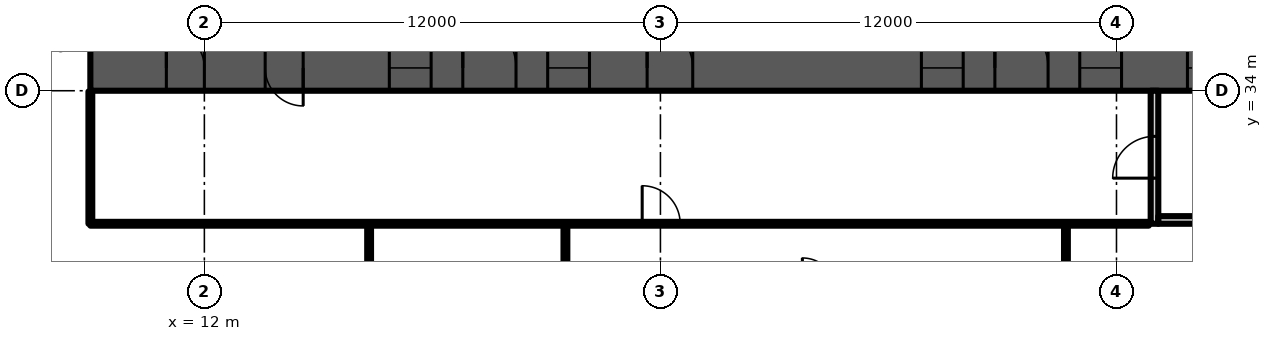
"""IFC4 building model, lengths in metres.
Left out: names, types, materials, properties, quantities, classifications, styles, units other than length and angle.
Written with IfcOpenShell. Run it as: python <this file> out.ifc"""

import sys

from ifc_helpers import new_model, si_unit, direction, frame, frame_2d, origin, place, context, subcontext, project, spatial, rectangle, extrude, element, fill, save


model = new_model("IFC4")
c1 = context("Model", 3, precision=1e-05, world=origin(), true_north=direction((0.0, 1.0)))
c2 = subcontext(c1, "Body", "Model", "MODEL_VIEW")
j1 = project(units=[si_unit("LENGTHUNIT", "METRE"), si_unit("PLANEANGLEUNIT", "RADIAN")], contexts=[c1])
p1 = place(None, origin())
s1 = spatial("IfcSite", under=j1, at=p1, CompositionType="ELEMENT")
p2 = place(p1, origin())
s2 = spatial("IfcBuilding", under=s1, at=p2, CompositionType="ELEMENT")
p3 = place(p2, frame((0.0, 0.0, 88.3)))
s3 = spatial("IfcBuildingStorey", under=s2, at=p3, CompositionType="ELEMENT", Elevation=88.3)
p4 = place(p3, frame((9.0, 34.6, 0.0), z_axis=(0.0, 0.0, 1.0), x_axis=(1.0, 0.0, 0.0)))
e1 = element("IfcWall", 1, at=p4, inside=s3, PredefinedType="SHEAR", context=c2, shape_type="SweptSolid", body=[
    extrude(rectangle(XDim=56.0, YDim=1.2, at=frame_2d((28.0, 0.0))), origin(), (0.0, 0.0, 1.0), 3.6),
])
p5 = place(p4, frame((2.0, 0.0, 0.0)))
e2 = element("IfcOpeningElement", 2, at=p5, cuts=e1, PredefinedType="OPENING", context=c2, shape_type="SweptSolid", body=[
    extrude(rectangle(XDim=1.0, YDim=2.1, at=frame_2d((0.5, 1.05))), frame((0.0, 0.61, 0.0), z_axis=(0.0, -1.0, 0.0), x_axis=(1.0, 0.0, 0.0)), (0.0, 0.0, 1.0), 1.22),
])
p6 = place(p4, frame((4.6, 0.0, 0.0)))
e3 = element("IfcOpeningElement", 3, at=p6, cuts=e1, PredefinedType="OPENING", context=c2, shape_type="SweptSolid", body=[
    extrude(rectangle(XDim=1.0, YDim=2.1, at=frame_2d((0.5, 1.05))), frame((0.0, 0.61, 0.0), z_axis=(0.0, -1.0, 0.0), x_axis=(1.0, 0.0, 0.0)), (0.0, 0.0, 1.0), 1.22),
])
p7 = place(p4, frame((7.867, 0.0, 0.0)))
e4 = element("IfcOpeningElement", 4, at=p7, cuts=e1, PredefinedType="OPENING", context=c2, shape_type="SweptSolid", body=[
    extrude(rectangle(XDim=1.1, YDim=2.1, at=frame_2d((0.55, 1.05))), frame((0.0, 0.61, 0.0), z_axis=(0.0, -1.0, 0.0), x_axis=(1.0, 0.0, 0.0)), (0.0, 0.0, 1.0), 1.22),
])
p8 = place(p4, frame((12.033, 0.0, 0.0)))
e5 = element("IfcOpeningElement", 5, at=p8, cuts=e1, PredefinedType="OPENING", context=c2, shape_type="SweptSolid", body=[
    extrude(rectangle(XDim=1.1, YDim=2.1, at=frame_2d((0.55, 1.05))), frame((0.0, 0.61, 0.0), z_axis=(0.0, -1.0, 0.0), x_axis=(1.0, 0.0, 0.0)), (0.0, 0.0, 1.0), 1.22),
])
p9 = place(p4, frame((9.8, 0.0, 0.0)))
e6 = element("IfcOpeningElement", 6, at=p9, cuts=e1, PredefinedType="OPENING", context=c2, shape_type="SweptSolid", body=[
    extrude(rectangle(XDim=1.4, YDim=2.1, at=frame_2d((0.7, 1.05))), frame((0.0, 0.61, 0.0), z_axis=(0.0, -1.0, 0.0), x_axis=(1.0, 0.0, 0.0)), (0.0, 0.0, 1.0), 1.22),
])
p10 = place(p4, frame((14.65, 0.0, 0.0)))
e7 = element("IfcOpeningElement", 7, at=p10, cuts=e1, PredefinedType="OPENING", context=c2, shape_type="SweptSolid", body=[
    extrude(rectangle(XDim=1.2, YDim=2.1, at=frame_2d((0.6, 1.05))), frame((0.0, 0.61, 0.0), z_axis=(0.0, -1.0, 0.0), x_axis=(1.0, 0.0, 0.0)), (0.0, 0.0, 1.0), 1.22),
])
p11 = place(p4, frame((21.867, 0.0, 0.0)))
e8 = element("IfcOpeningElement", 8, at=p11, cuts=e1, PredefinedType="OPENING", context=c2, shape_type="SweptSolid", body=[
    extrude(rectangle(XDim=1.1, YDim=2.1, at=frame_2d((0.55, 1.05))), frame((0.0, 0.61, 0.0), z_axis=(0.0, -1.0, 0.0), x_axis=(1.0, 0.0, 0.0)), (0.0, 0.0, 1.0), 1.22),
])
p12 = place(p4, frame((26.033, 0.0, 0.0)))
e9 = element("IfcOpeningElement", 9, at=p12, cuts=e1, PredefinedType="OPENING", context=c2, shape_type="SweptSolid", body=[
    extrude(rectangle(XDim=1.1, YDim=2.1, at=frame_2d((0.55, 1.05))), frame((0.0, 0.61, 0.0), z_axis=(0.0, -1.0, 0.0), x_axis=(1.0, 0.0, 0.0)), (0.0, 0.0, 1.0), 1.22),
])
p13 = place(p4, frame((23.8, 0.0, 0.0)))
e10 = element("IfcOpeningElement", 10, at=p13, cuts=e1, PredefinedType="OPENING", context=c2, shape_type="SweptSolid", body=[
    extrude(rectangle(XDim=1.4, YDim=2.1, at=frame_2d((0.7, 1.05))), frame((0.0, 0.61, 0.0), z_axis=(0.0, -1.0, 0.0), x_axis=(1.0, 0.0, 0.0)), (0.0, 0.0, 1.0), 1.22),
])
p14 = place(p4, frame((28.867, 0.0, 0.0)))
e11 = element("IfcOpeningElement", 11, at=p14, cuts=e1, PredefinedType="OPENING", context=c2, shape_type="SweptSolid", body=[
    extrude(rectangle(XDim=1.1, YDim=2.1, at=frame_2d((0.55, 1.05))), frame((0.0, 0.61, 0.0), z_axis=(0.0, -1.0, 0.0), x_axis=(1.0, 0.0, 0.0)), (0.0, 0.0, 1.0), 1.22),
])
p15 = place(p4, frame((33.033, 0.0, 0.0)))
e12 = element("IfcOpeningElement", 12, at=p15, cuts=e1, PredefinedType="OPENING", context=c2, shape_type="SweptSolid", body=[
    extrude(rectangle(XDim=1.1, YDim=2.1, at=frame_2d((0.55, 1.05))), frame((0.0, 0.61, 0.0), z_axis=(0.0, -1.0, 0.0), x_axis=(1.0, 0.0, 0.0)), (0.0, 0.0, 1.0), 1.22),
])
p16 = place(p4, frame((40.15, 0.0, 0.0)))
e13 = element("IfcOpeningElement", 13, at=p16, cuts=e1, PredefinedType="OPENING", context=c2, shape_type="SweptSolid", body=[
    extrude(rectangle(XDim=1.2, YDim=2.1, at=frame_2d((0.6, 1.05))), frame((0.0, 0.61, 0.0), z_axis=(0.0, -1.0, 0.0), x_axis=(1.0, 0.0, 0.0)), (0.0, 0.0, 1.0), 1.22),
])
p17 = place(p4, frame((44.8, 0.0, 0.0)))
e14 = element("IfcOpeningElement", 14, at=p17, cuts=e1, PredefinedType="OPENING", context=c2, shape_type="SweptSolid", body=[
    extrude(rectangle(XDim=1.4, YDim=2.1, at=frame_2d((0.7, 1.05))), frame((0.0, 0.61, 0.0), z_axis=(0.0, -1.0, 0.0), x_axis=(1.0, 0.0, 0.0)), (0.0, 0.0, 1.0), 1.22),
])
p18 = place(p4, frame((49.867, 0.0, 0.0)))
e15 = element("IfcOpeningElement", 15, at=p18, cuts=e1, PredefinedType="OPENING", context=c2, shape_type="SweptSolid", body=[
    extrude(rectangle(XDim=1.1, YDim=2.1, at=frame_2d((0.55, 1.05))), frame((0.0, 0.61, 0.0), z_axis=(0.0, -1.0, 0.0), x_axis=(1.0, 0.0, 0.0)), (0.0, 0.0, 1.0), 1.22),
])
p19 = place(p4, frame((53.5, 0.0, 0.0)))
e16 = element("IfcOpeningElement", 16, at=p19, cuts=e1, PredefinedType="OPENING", context=c2, shape_type="SweptSolid", body=[
    extrude(rectangle(XDim=1.1, YDim=2.1, at=frame_2d((0.55, 1.05))), frame((0.0, 0.61, 0.0), z_axis=(0.0, -1.0, 0.0), x_axis=(1.0, 0.0, 0.0)), (0.0, 0.0, 1.0), 1.22),
])
p20 = place(p4, frame((51.567, 0.0, 0.0)))
e17 = element("IfcOpeningElement", 17, at=p20, cuts=e1, PredefinedType="OPENING", context=c2, shape_type="SweptSolid", body=[
    extrude(rectangle(XDim=1.4, YDim=2.1, at=frame_2d((0.7, 1.05))), frame((0.0, 0.61, 0.0), z_axis=(0.0, -1.0, 0.0), x_axis=(1.0, 0.0, 0.0)), (0.0, 0.0, 1.0), 1.22),
])
p21 = place(p3, frame((37.0, 30.5, 0.0), z_axis=(0.0, 0.0, 1.0), x_axis=(0.0, 1.0, 0.0)))
e18 = element("IfcWall", 18, at=p21, inside=s3, PredefinedType="PARTITIONING", context=c2, shape_type="SweptSolid", body=[
    extrude(rectangle(XDim=3.5, YDim=0.2, at=frame_2d((1.75, 0.0))), origin(), (0.0, 0.0, 1.0), 3.15),
])
p22 = place(p21, frame((1.2, 0.0, 0.0)))
e19 = element("IfcOpeningElement", 19, at=p22, cuts=e18, PredefinedType="OPENING", context=c2, shape_type="SweptSolid", body=[
    extrude(rectangle(XDim=1.1, YDim=2.1, at=frame_2d((0.55, 1.05))), frame((0.0, 0.11, 0.0), z_axis=(0.0, -1.0, 0.0), x_axis=(1.0, 0.0, 0.0)), (0.0, 0.0, 1.0), 0.22),
])
p23 = place(p3, frame((37.1, 30.6, 0.0), z_axis=(0.0, 0.0, 1.0), x_axis=(1.0, 0.0, 0.0)))
e20 = element("IfcWall", 20, at=p23, inside=s3, PredefinedType="PARTITIONING", context=c2, shape_type="SweptSolid", body=[
    extrude(rectangle(XDim=2.8, YDim=0.2, at=frame_2d((1.4, 0.0))), origin(), (0.0, 0.0, 1.0), 3.15),
])
p24 = place(p3, frame((9.0, 30.5, 0.0), z_axis=(0.0, 0.0, 1.0), x_axis=(0.0, 1.0, 0.0)))
e21 = element("IfcWall", 21, at=p24, inside=s3, PredefinedType="PARTITIONING", context=c2, shape_type="SweptSolid", body=[
    extrude(rectangle(XDim=3.48, YDim=0.1, at=frame_2d((1.74, 0.0))), origin(), (0.0, 0.0, 1.0), 3.15),
])
p25 = place(p3, frame((9.0, 30.5, 0.0), z_axis=(0.0, 0.0, 1.0), x_axis=(1.0, 0.0, 0.0)))
e22 = element("IfcWall", 22, at=p25, inside=s3, PredefinedType="PARTITIONING", context=c2, shape_type="SweptSolid", body=[
    extrude(rectangle(XDim=27.85, YDim=0.1, at=frame_2d((13.925, 0.0))), origin(), (0.0, 0.0, 1.0), 3.15),
])
p26 = place(p25, frame((14.52, 0.0, 0.0)))
e23 = element("IfcOpeningElement", 23, at=p26, cuts=e22, PredefinedType="OPENING", context=c2, shape_type="SweptSolid", body=[
    extrude(rectangle(XDim=1.0, YDim=2.1, at=frame_2d((0.5, 1.05))), frame((0.0, 0.06, 0.0), z_axis=(0.0, -1.0, 0.0), x_axis=(1.0, 0.0, 0.0)), (0.0, 0.0, 1.0), 0.12),
])
for number, where, z_axis, x_axis in (
    (24, (16.335, 14.93, 0.0), (0.0, 0.0, 1.0), (0.0, 1.0, 0.0)),
    (25, (21.5, 14.93, 0.0), (0.0, 0.0, 1.0), (0.0, 1.0, 0.0)),
):
    element("IfcWall", number, at=place(p3, frame(where, z_axis=z_axis, x_axis=x_axis)), inside=s3, PredefinedType="PARTITIONING", context=c2, shape_type="SweptSolid", body=[
        extrude(rectangle(XDim=15.57, YDim=0.1, at=frame_2d((7.785, 0.0))), origin(), (0.0, 0.0, 1.0), 3.15),
    ])
p27 = place(p3, frame((34.67, 14.93, 0.0), z_axis=(0.0, 0.0, 1.0), x_axis=(0.0, 1.0, 0.0)))
e26 = element("IfcWall", 26, at=p27, inside=s3, PredefinedType="PARTITIONING", context=c2, shape_type="SweptSolid", body=[
    extrude(rectangle(XDim=15.56, YDim=0.1, at=frame_2d((7.78, 0.0))), origin(), (0.0, 0.0, 1.0), 3.15),
])
p28 = place(p5, origin())
e27 = element("IfcDoor", 27, at=p28, inside=s3, OperationType="SINGLE_SWING_LEFT", PredefinedType="DOOR", context=c2, shape_type="SweptSolid", body=[
    extrude(rectangle(XDim=1.0, YDim=2.1, at=frame_2d((0.5, 1.05))), frame((0.0, 0.6, 0.0), z_axis=(0.0, -1.0, 0.0), x_axis=(1.0, 0.0, 0.0)), (0.0, 0.0, 1.0), 1.199),
])
fill(e2, e27)
p29 = place(p6, origin())
e28 = element("IfcDoor", 28, at=p29, inside=s3, OperationType="SINGLE_SWING_RIGHT", PredefinedType="DOOR", context=c2, shape_type="SweptSolid", body=[
    extrude(rectangle(XDim=1.0, YDim=2.1, at=frame_2d((0.5, 1.05))), frame((0.0, 0.6, 0.0), z_axis=(0.0, -1.0, 0.0), x_axis=(1.0, 0.0, 0.0)), (0.0, 0.0, 1.0), 1.199),
])
fill(e3, e28)
p30 = place(p7, origin())
e29 = element("IfcDoor", 29, at=p30, inside=s3, OperationType="DOUBLE_DOOR_SLIDING", PredefinedType="DOOR", context=c2, shape_type="SweptSolid", body=[
    extrude(rectangle(XDim=1.1, YDim=2.1, at=frame_2d((0.55, 1.05))), frame((0.0, 0.025, 0.0), z_axis=(0.0, -1.0, 0.0), x_axis=(1.0, 0.0, 0.0)), (0.0, 0.0, 1.0), 0.05),
])
fill(e4, e29)
p31 = place(p8, origin())
e30 = element("IfcDoor", 30, at=p31, inside=s3, OperationType="DOUBLE_DOOR_SLIDING", PredefinedType="DOOR", context=c2, shape_type="SweptSolid", body=[
    extrude(rectangle(XDim=1.1, YDim=2.1, at=frame_2d((0.55, 1.05))), frame((0.0, 0.025, 0.0), z_axis=(0.0, -1.0, 0.0), x_axis=(1.0, 0.0, 0.0)), (0.0, 0.0, 1.0), 0.05),
])
fill(e5, e30)
p32 = place(p9, origin())
e31 = element("IfcDoor", 31, at=p32, inside=s3, OperationType="DOUBLE_DOOR_SINGLE_SWING", PredefinedType="DOOR", context=c2, shape_type="SweptSolid", body=[
    extrude(rectangle(XDim=1.4, YDim=2.1, at=frame_2d((0.7, 1.05))), frame((0.0, 0.025, 0.0), z_axis=(0.0, -1.0, 0.0), x_axis=(1.0, 0.0, 0.0)), (0.0, 0.0, 1.0), 0.05),
])
fill(e6, e31)
p33 = place(p10, origin())
e32 = element("IfcDoor", 32, at=p33, inside=s3, OperationType="SINGLE_SWING_LEFT", PredefinedType="DOOR", context=c2, shape_type="SweptSolid", body=[
    extrude(rectangle(XDim=1.2, YDim=2.1, at=frame_2d((0.6, 1.05))), frame((0.0, 0.025, 0.0), z_axis=(0.0, -1.0, 0.0), x_axis=(1.0, 0.0, 0.0)), (0.0, 0.0, 1.0), 0.05),
])
fill(e7, e32)
p34 = place(p11, origin())
e33 = element("IfcDoor", 33, at=p34, inside=s3, OperationType="DOUBLE_DOOR_SLIDING", PredefinedType="DOOR", context=c2, shape_type="SweptSolid", body=[
    extrude(rectangle(XDim=1.1, YDim=2.1, at=frame_2d((0.55, 1.05))), frame((0.0, 0.025, 0.0), z_axis=(0.0, -1.0, 0.0), x_axis=(1.0, 0.0, 0.0)), (0.0, 0.0, 1.0), 0.05),
])
fill(e8, e33)
p35 = place(p12, origin())
e34 = element("IfcDoor", 34, at=p35, inside=s3, OperationType="DOUBLE_DOOR_SLIDING", PredefinedType="DOOR", context=c2, shape_type="SweptSolid", body=[
    extrude(rectangle(XDim=1.1, YDim=2.1, at=frame_2d((0.55, 1.05))), frame((0.0, 0.025, 0.0), z_axis=(0.0, -1.0, 0.0), x_axis=(1.0, 0.0, 0.0)), (0.0, 0.0, 1.0), 0.05),
])
fill(e9, e34)
p36 = place(p13, origin())
e35 = element("IfcDoor", 35, at=p36, inside=s3, OperationType="DOUBLE_DOOR_SINGLE_SWING", PredefinedType="DOOR", context=c2, shape_type="SweptSolid", body=[
    extrude(rectangle(XDim=1.4, YDim=2.1, at=frame_2d((0.7, 1.05))), frame((0.0, 0.025, 0.0), z_axis=(0.0, -1.0, 0.0), x_axis=(1.0, 0.0, 0.0)), (0.0, 0.0, 1.0), 0.05),
])
fill(e10, e35)
p37 = place(p14, origin())
e36 = element("IfcDoor", 36, at=p37, inside=s3, OperationType="DOUBLE_DOOR_SLIDING", PredefinedType="DOOR", context=c2, shape_type="SweptSolid", body=[
    extrude(rectangle(XDim=1.1, YDim=2.1, at=frame_2d((0.55, 1.05))), frame((0.0, 0.025, 0.0), z_axis=(0.0, -1.0, 0.0), x_axis=(1.0, 0.0, 0.0)), (0.0, 0.0, 1.0), 0.05),
])
fill(e11, e36)
p38 = place(p22, origin())
e37 = element("IfcDoor", 37, at=p38, inside=s3, OperationType="SINGLE_SWING_LEFT", PredefinedType="DOOR", context=c2, shape_type="SweptSolid", body=[
    extrude(rectangle(XDim=1.1, YDim=2.1, at=frame_2d((0.55, 1.05))), frame((0.0, 0.025, 0.0), z_axis=(0.0, -1.0, 0.0), x_axis=(1.0, 0.0, 0.0)), (0.0, 0.0, 1.0), 0.05),
])
fill(e19, e37)
p39 = place(p26, origin())
e38 = element("IfcDoor", 38, at=p39, inside=s3, OperationType="SINGLE_SWING_LEFT", PredefinedType="DOOR", context=c2, shape_type="SweptSolid", body=[
    extrude(rectangle(XDim=1.0, YDim=2.1, at=frame_2d((0.5, 1.05))), frame((0.0, 0.025, 0.0), z_axis=(0.0, -1.0, 0.0), x_axis=(1.0, 0.0, 0.0)), (0.0, 0.0, 1.0), 0.05),
])
fill(e23, e38)
save(model, sys.argv[1])
